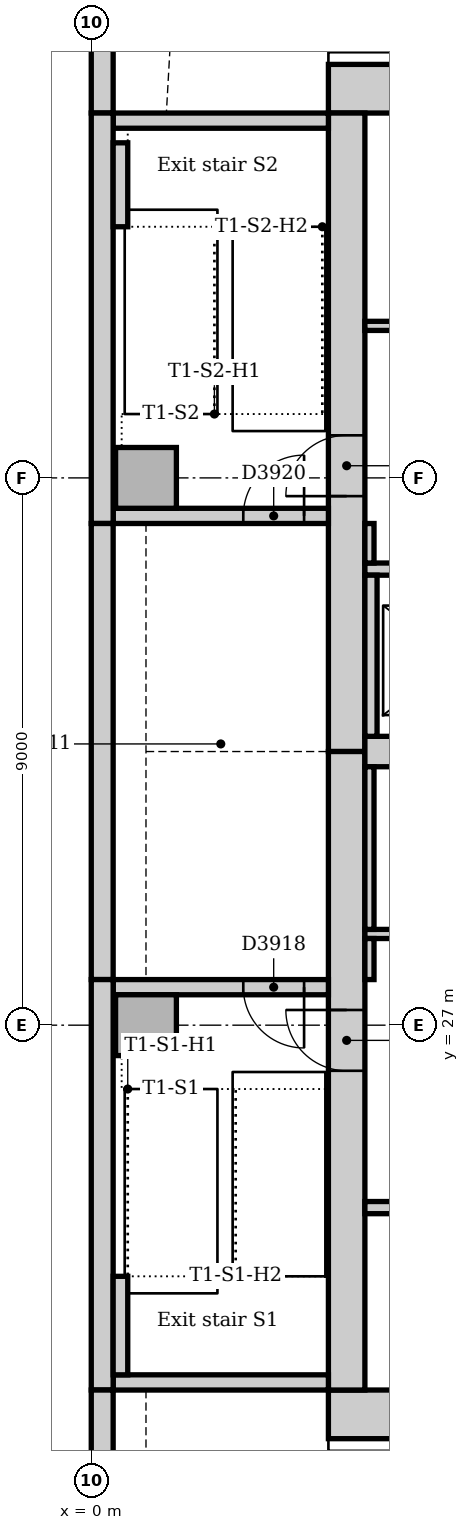
"""IFC4 building model, lengths in metres.
Left out: names, types, materials, properties, quantities, classifications, styles, units other than length and angle.
Written with IfcOpenShell. Run it as: python <this file> out.ifc"""

import sys

from ifc_helpers import new_model, si_unit, direction, frame, frame_2d, origin, origin_2d, place, context, subcontext, project, spatial, rectangle, extrude, element, fill, save


model = new_model("IFC4")
c1 = context("Model", 3, precision=1e-05, world=origin(), true_north=direction((0.0, 1.0)))
c2 = subcontext(c1, "Body", "Model", "MODEL_VIEW")
j1 = project(units=[si_unit("LENGTHUNIT", "METRE"), si_unit("PLANEANGLEUNIT", "RADIAN")], contexts=[c1])
p1 = place(None, origin())
s1 = spatial("IfcSite", under=j1, at=p1, CompositionType="ELEMENT")
p2 = place(p1, origin())
s2 = spatial("IfcBuilding", under=s1, at=p2, CompositionType="ELEMENT")
p3 = place(p2, frame((0.0, 0.0, 100.0)))
s3 = spatial("IfcBuildingStorey", under=s2, at=p3, CompositionType="ELEMENT", Elevation=100.0)
for number, where, z_axis, x_axis in (
    (1, (3.9, 20.6, 0.0), (0.0, 0.0, 1.0), (1.0, 0.0, 0.0)),
    (2, (23.3, 42.4, 0.0), (0.0, 0.0, 1.0), (-1.0, 0.0, 0.0)),
):
    element("IfcWall", number, at=place(p3, frame(where, z_axis=z_axis, x_axis=x_axis)), inside=s3, PredefinedType="SOLIDWALL", context=c2, shape_type="SweptSolid", body=[
        extrude(rectangle(XDim=19.4, YDim=0.8, at=frame_2d((9.7, 0.0))), origin(), (0.0, 0.0, 1.0), 4.0),
    ])
p4 = place(p3, frame((4.2, 42.0, 0.0), z_axis=(0.0, 0.0, 1.0), x_axis=(0.0, -1.0, 0.0)))
e3 = element("IfcWall", 3, at=p4, inside=s3, PredefinedType="SOLIDWALL", context=c2, shape_type="SweptSolid", body=[
    extrude(rectangle(XDim=10.5, YDim=0.6, at=frame_2d((5.25, 0.0))), origin(), (0.0, 0.0, 1.0), 4.0),
])
p5 = place(p4, frame((5.3, 0.0, 0.0)))
e4 = element("IfcOpeningElement", 4, at=p5, cuts=e3, PredefinedType="OPENING", context=c2, shape_type="SweptSolid", body=[
    extrude(rectangle(XDim=1.0, YDim=2.1, at=frame_2d((0.5, 1.05))), frame((0.0, 0.31, 0.0), z_axis=(0.0, -1.0, 0.0), x_axis=(1.0, 0.0, 0.0)), (0.0, 0.0, 1.0), 0.62),
])
p6 = place(p3, frame((4.2, 31.5, 0.0), z_axis=(0.0, 0.0, 1.0), x_axis=(0.0, -1.0, 0.0)))
e5 = element("IfcWall", 5, at=p6, inside=s3, PredefinedType="SOLIDWALL", context=c2, shape_type="SweptSolid", body=[
    extrude(rectangle(XDim=10.5, YDim=0.6, at=frame_2d((5.25, 0.0))), origin(), (0.0, 0.0, 1.0), 4.0),
])
p7 = place(p6, frame((4.25, 0.0, 0.0)))
e6 = element("IfcOpeningElement", 6, at=p7, cuts=e5, PredefinedType="OPENING", context=c2, shape_type="SweptSolid", body=[
    extrude(rectangle(XDim=1.0, YDim=2.1, at=frame_2d((0.5, 1.05))), frame((0.0, 0.31, 0.0), z_axis=(0.0, -1.0, 0.0), x_axis=(1.0, 0.0, 0.0)), (0.0, 0.0, 1.0), 0.62),
])
p8 = place(p3, frame((4.5, 31.5, 0.0), z_axis=(0.0, 0.0, 1.0), x_axis=(1.0, 0.0, 0.0)))
e7 = element("IfcWall", 7, at=p8, inside=s3, PredefinedType="SOLIDWALL", context=c2, shape_type="SweptSolid", body=[
    extrude(rectangle(XDim=18.0, YDim=0.5, at=frame_2d((9.0, 0.0))), origin(), (0.0, 0.0, 1.0), 4.0),
])
p9 = place(p3, frame((0.36, 21.125, 0.0), z_axis=(0.0, 0.0, 1.0), x_axis=(1.0, 0.0, 0.0)))
e8 = element("IfcWall", 8, at=p9, inside=s3, PredefinedType="SOLIDWALL", context=c2, shape_type="SweptSolid", body=[
    extrude(rectangle(XDim=3.54, YDim=0.25, at=frame_2d((1.77, 0.0))), origin(), (0.0, 0.0, 1.0), 4.0),
])
p10 = place(p3, frame((3.9, 27.625, 0.0), z_axis=(0.0, 0.0, 1.0), x_axis=(-1.0, 0.0, 0.0)))
e9 = element("IfcWall", 9, at=p10, inside=s3, PredefinedType="SOLIDWALL", context=c2, shape_type="SweptSolid", body=[
    extrude(rectangle(XDim=3.54, YDim=0.25, at=frame_2d((1.77, 0.0))), origin(), (0.0, 0.0, 1.0), 4.0),
])
p11 = place(p10, frame((0.4, 0.0, 0.0)))
e10 = element("IfcOpeningElement", 10, at=p11, cuts=e9, PredefinedType="OPENING", context=c2, shape_type="SweptSolid", body=[
    extrude(rectangle(XDim=1.0, YDim=2.1, at=frame_2d((0.5, 1.05))), frame((0.0, 0.135, 0.0), z_axis=(0.0, -1.0, 0.0), x_axis=(1.0, 0.0, 0.0)), (0.0, 0.0, 1.0), 0.27),
])
p12 = place(p3, frame((0.36, 35.375, 0.0), z_axis=(0.0, 0.0, 1.0), x_axis=(1.0, 0.0, 0.0)))
e11 = element("IfcWall", 11, at=p12, inside=s3, PredefinedType="SOLIDWALL", context=c2, shape_type="SweptSolid", body=[
    extrude(rectangle(XDim=3.54, YDim=0.25, at=frame_2d((1.77, 0.0))), origin(), (0.0, 0.0, 1.0), 4.0),
])
p13 = place(p12, frame((2.14, 0.0, 0.0)))
e12 = element("IfcOpeningElement", 12, at=p13, cuts=e11, PredefinedType="OPENING", context=c2, shape_type="SweptSolid", body=[
    extrude(rectangle(XDim=1.0, YDim=2.1, at=frame_2d((0.5, 1.05))), frame((0.0, 0.135, 0.0), z_axis=(0.0, -1.0, 0.0), x_axis=(1.0, 0.0, 0.0)), (0.0, 0.0, 1.0), 0.27),
])
p14 = place(p3, frame((3.9, 41.875, 0.0), z_axis=(0.0, 0.0, 1.0), x_axis=(-1.0, 0.0, 0.0)))
e13 = element("IfcWall", 13, at=p14, inside=s3, PredefinedType="SOLIDWALL", context=c2, shape_type="SweptSolid", body=[
    extrude(rectangle(XDim=3.54, YDim=0.25, at=frame_2d((1.77, 0.0))), origin(), (0.0, 0.0, 1.0), 4.0),
])
for number, where, z_axis, x_axis in (
    (14, (0.9, 27.0, 0.0), (0.0, 0.0, 1.0), (1.0, 0.0, 0.0)),
    (15, (0.9, 36.0, 0.0), (0.0, 0.0, 1.0), (1.0, 0.0, 0.0)),
):
    element("IfcColumn", number, at=place(p3, frame(where, z_axis=z_axis, x_axis=x_axis)), inside=s3, PredefinedType="COLUMN", context=c2, shape_type="SweptSolid", body=[
        extrude(rectangle(XDim=1.0, YDim=1.0, at=origin_2d()), origin(), (0.0, 0.0, 1.0), 4.0),
    ])
p15 = place(p3, frame((0.18, 45.257, 0.0), z_axis=(0.0, 0.0, 1.0), x_axis=(0.0, -1.0, 0.0)))
e16 = element("IfcWall", 16, at=p15, inside=s3, PredefinedType="STANDARD", context=c2, shape_type="SweptSolid", body=[
    extrude(rectangle(XDim=3.257, YDim=0.36, at=frame_2d((1.629, 0.0))), origin(), (0.0, 0.0, 1.0), 3.85),
])
p16 = place(p3, frame((0.18, 42.0, 0.0), z_axis=(0.0, 0.0, 1.0), x_axis=(0.0, -1.0, 0.0)))
e17 = element("IfcWall", 17, at=p16, inside=s3, PredefinedType="STANDARD", context=c2, shape_type="SweptSolid", body=[
    extrude(rectangle(XDim=6.75, YDim=0.36, at=frame_2d((3.375, 0.0))), origin(), (0.0, 0.0, 1.0), 3.85),
])
p17 = place(p3, frame((0.18, 35.25, 0.0), z_axis=(0.0, 0.0, 1.0), x_axis=(0.0, -1.0, 0.0)))
e18 = element("IfcWall", 18, at=p17, inside=s3, PredefinedType="STANDARD", context=c2, shape_type="SweptSolid", body=[
    extrude(rectangle(XDim=7.5, YDim=0.36, at=frame_2d((3.75, 0.0))), origin(), (0.0, 0.0, 1.0), 3.85),
])
p18 = place(p3, frame((0.18, 27.75, 0.0), z_axis=(0.0, 0.0, 1.0), x_axis=(0.0, -1.0, 0.0)))
e19 = element("IfcWall", 19, at=p18, inside=s3, PredefinedType="STANDARD", context=c2, shape_type="SweptSolid", body=[
    extrude(rectangle(XDim=6.75, YDim=0.36, at=frame_2d((3.375, 0.0))), origin(), (0.0, 0.0, 1.0), 3.85),
])
p19 = place(p3, frame((0.18, 21.0, 0.0), z_axis=(0.0, 0.0, 1.0), x_axis=(0.0, -1.0, 0.0)))
e20 = element("IfcWall", 20, at=p19, inside=s3, PredefinedType="STANDARD", context=c2, shape_type="SweptSolid", body=[
    extrude(rectangle(XDim=12.257, YDim=0.36, at=frame_2d((6.129, 0.0))), origin(), (0.0, 0.0, 1.0), 3.85),
])
p20 = place(p19, frame((1.35, 0.0, 0.9)))
e21 = element("IfcOpeningElement", 21, at=p20, cuts=e20, PredefinedType="OPENING", context=c2, shape_type="SweptSolid", body=[
    extrude(rectangle(XDim=3.3, YDim=1.6, at=frame_2d((1.65, 0.8))), frame((0.0, 0.19, 0.0), z_axis=(0.0, -1.0, 0.0), x_axis=(1.0, 0.0, 0.0)), (0.0, 0.0, 1.0), 0.38),
])
p21 = place(p19, frame((5.85, 0.0, 0.9)))
e22 = element("IfcOpeningElement", 22, at=p21, cuts=e20, PredefinedType="OPENING", context=c2, shape_type="SweptSolid", body=[
    extrude(rectangle(XDim=3.3, YDim=1.6, at=frame_2d((1.65, 0.8))), frame((0.0, 0.19, 0.0), z_axis=(0.0, -1.0, 0.0), x_axis=(1.0, 0.0, 0.0)), (0.0, 0.0, 1.0), 0.38),
])
p22 = place(p3, frame((0.48, 21.25, 0.0), z_axis=(0.0, 0.0, 1.0), x_axis=(0.0, 1.0, 0.0)))
e23 = element("IfcWall", 23, at=p22, inside=s3, PredefinedType="STANDARD", context=c2, shape_type="SweptSolid", body=[
    extrude(rectangle(XDim=1.62, YDim=0.24, at=frame_2d((0.81, 0.0))), origin(), (0.0, 0.0, 1.0), 4.0),
])
p23 = place(p3, frame((0.48, 40.13, 0.0), z_axis=(0.0, 0.0, 1.0), x_axis=(0.0, 1.0, 0.0)))
e24 = element("IfcWall", 24, at=p23, inside=s3, PredefinedType="STANDARD", context=c2, shape_type="SweptSolid", body=[
    extrude(rectangle(XDim=1.38, YDim=0.24, at=frame_2d((0.69, 0.0))), origin(), (0.0, 0.0, 1.0), 4.0),
])
p24 = place(p3, frame((4.5, 24.0, 0.0), z_axis=(0.0, 0.0, 1.0), x_axis=(1.0, 0.0, 0.0)))
e25 = element("IfcWall", 25, at=p24, inside=s3, PredefinedType="PARTITIONING", context=c2, shape_type="SweptSolid", body=[
    extrude(rectangle(XDim=18.0, YDim=0.2, at=frame_2d((9.0, 0.0))), origin(), (0.0, 0.0, 1.0), 3.85),
])
p25 = place(p24, frame((0.95, 0.0, 0.0)))
e26 = element("IfcOpeningElement", 26, at=p25, cuts=e25, PredefinedType="OPENING", context=c2, shape_type="SweptSolid", body=[
    extrude(rectangle(XDim=1.1, YDim=2.1, at=frame_2d((0.55, 1.05))), frame((0.0, 0.11, 0.0), z_axis=(0.0, -1.0, 0.0), x_axis=(1.0, 0.0, 0.0)), (0.0, 0.0, 1.0), 0.22),
])
p26 = place(p24, frame((3.95, 0.0, 0.0)))
e27 = element("IfcOpeningElement", 27, at=p26, cuts=e25, PredefinedType="OPENING", context=c2, shape_type="SweptSolid", body=[
    extrude(rectangle(XDim=1.1, YDim=2.1, at=frame_2d((0.55, 1.05))), frame((0.0, 0.11, 0.0), z_axis=(0.0, -1.0, 0.0), x_axis=(1.0, 0.0, 0.0)), (0.0, 0.0, 1.0), 0.22),
])
p27 = place(p24, frame((6.95, 0.0, 0.0)))
e28 = element("IfcOpeningElement", 28, at=p27, cuts=e25, PredefinedType="OPENING", context=c2, shape_type="SweptSolid", body=[
    extrude(rectangle(XDim=1.1, YDim=2.1, at=frame_2d((0.55, 1.05))), frame((0.0, 0.11, 0.0), z_axis=(0.0, -1.0, 0.0), x_axis=(1.0, 0.0, 0.0)), (0.0, 0.0, 1.0), 0.22),
])
p28 = place(p24, frame((9.95, 0.0, 0.0)))
e29 = element("IfcOpeningElement", 29, at=p28, cuts=e25, PredefinedType="OPENING", context=c2, shape_type="SweptSolid", body=[
    extrude(rectangle(XDim=1.1, YDim=2.1, at=frame_2d((0.55, 1.05))), frame((0.0, 0.11, 0.0), z_axis=(0.0, -1.0, 0.0), x_axis=(1.0, 0.0, 0.0)), (0.0, 0.0, 1.0), 0.22),
])
p29 = place(p24, frame((12.95, 0.0, 0.0)))
e30 = element("IfcOpeningElement", 30, at=p29, cuts=e25, PredefinedType="OPENING", context=c2, shape_type="SweptSolid", body=[
    extrude(rectangle(XDim=1.1, YDim=2.1, at=frame_2d((0.55, 1.05))), frame((0.0, 0.11, 0.0), z_axis=(0.0, -1.0, 0.0), x_axis=(1.0, 0.0, 0.0)), (0.0, 0.0, 1.0), 0.22),
])
p30 = place(p24, frame((15.95, 0.0, 0.0)))
e31 = element("IfcOpeningElement", 31, at=p30, cuts=e25, PredefinedType="OPENING", context=c2, shape_type="SweptSolid", body=[
    extrude(rectangle(XDim=1.1, YDim=2.1, at=frame_2d((0.55, 1.05))), frame((0.0, 0.11, 0.0), z_axis=(0.0, -1.0, 0.0), x_axis=(1.0, 0.0, 0.0)), (0.0, 0.0, 1.0), 0.22),
])
p31 = place(p3, frame((4.5, 34.5, 0.0), z_axis=(0.0, 0.0, 1.0), x_axis=(1.0, 0.0, 0.0)))
e32 = element("IfcWall", 32, at=p31, inside=s3, PredefinedType="PARTITIONING", context=c2, shape_type="SweptSolid", body=[
    extrude(rectangle(XDim=18.0, YDim=0.2, at=frame_2d((9.0, 0.0))), origin(), (0.0, 0.0, 1.0), 3.85),
])
p32 = place(p31, frame((0.95, 0.0, 0.0)))
e33 = element("IfcOpeningElement", 33, at=p32, cuts=e32, PredefinedType="OPENING", context=c2, shape_type="SweptSolid", body=[
    extrude(rectangle(XDim=1.1, YDim=2.1, at=frame_2d((0.55, 1.05))), frame((0.0, 0.11, 0.0), z_axis=(0.0, -1.0, 0.0), x_axis=(1.0, 0.0, 0.0)), (0.0, 0.0, 1.0), 0.22),
])
p33 = place(p31, frame((3.95, 0.0, 0.0)))
e34 = element("IfcOpeningElement", 34, at=p33, cuts=e32, PredefinedType="OPENING", context=c2, shape_type="SweptSolid", body=[
    extrude(rectangle(XDim=1.1, YDim=2.1, at=frame_2d((0.55, 1.05))), frame((0.0, 0.11, 0.0), z_axis=(0.0, -1.0, 0.0), x_axis=(1.0, 0.0, 0.0)), (0.0, 0.0, 1.0), 0.22),
])
p34 = place(p31, frame((12.95, 0.0, 0.0)))
e35 = element("IfcOpeningElement", 35, at=p34, cuts=e32, PredefinedType="OPENING", context=c2, shape_type="SweptSolid", body=[
    extrude(rectangle(XDim=1.1, YDim=2.1, at=frame_2d((0.55, 1.05))), frame((0.0, 0.11, 0.0), z_axis=(0.0, -1.0, 0.0), x_axis=(1.0, 0.0, 0.0)), (0.0, 0.0, 1.0), 0.22),
])
p35 = place(p31, frame((15.95, 0.0, 0.0)))
e36 = element("IfcOpeningElement", 36, at=p35, cuts=e32, PredefinedType="OPENING", context=c2, shape_type="SweptSolid", body=[
    extrude(rectangle(XDim=1.1, YDim=2.1, at=frame_2d((0.55, 1.05))), frame((0.0, 0.11, 0.0), z_axis=(0.0, -1.0, 0.0), x_axis=(1.0, 0.0, 0.0)), (0.0, 0.0, 1.0), 0.22),
])
p36 = place(p3, frame((4.6, 31.75, 0.0), z_axis=(0.0, 0.0, 1.0), x_axis=(0.0, 1.0, 0.0)))
e37 = element("IfcWall", 37, at=p36, inside=s3, PredefinedType="PARTITIONING", context=c2, shape_type="SweptSolid", body=[
    extrude(rectangle(XDim=2.65, YDim=0.2, at=frame_2d((1.325, 0.0))), origin(), (0.0, 0.0, 1.0), 3.85),
])
p37 = place(p3, frame((4.5, 28.5, 0.0), z_axis=(0.0, 0.0, 1.0), x_axis=(1.0, 0.0, 0.0)))
e38 = element("IfcWall", 38, at=p37, inside=s3, PredefinedType="PARTITIONING", context=c2, shape_type="SweptSolid", body=[
    extrude(rectangle(XDim=18.0, YDim=0.15, at=frame_2d((9.0, 0.0))), origin(), (0.0, 0.0, 1.0), 3.85),
])
p38 = place(p37, frame((3.35, 0.0, 0.0)))
e39 = element("IfcOpeningElement", 39, at=p38, cuts=e38, PredefinedType="OPENING", context=c2, shape_type="SweptSolid", body=[
    extrude(rectangle(XDim=0.9, YDim=2.1, at=frame_2d((0.45, 1.05))), frame((0.0, 0.085, 0.0), z_axis=(0.0, -1.0, 0.0), x_axis=(1.0, 0.0, 0.0)), (0.0, 0.0, 1.0), 0.17),
])
p39 = place(p37, frame((8.55, 0.0, 0.0)))
e40 = element("IfcOpeningElement", 40, at=p39, cuts=e38, PredefinedType="OPENING", context=c2, shape_type="SweptSolid", body=[
    extrude(rectangle(XDim=0.9, YDim=2.1, at=frame_2d((0.45, 1.05))), frame((0.0, 0.085, 0.0), z_axis=(0.0, -1.0, 0.0), x_axis=(1.0, 0.0, 0.0)), (0.0, 0.0, 1.0), 0.17),
])
p40 = place(p37, frame((13.7, 0.0, 0.0)))
e41 = element("IfcOpeningElement", 41, at=p40, cuts=e38, PredefinedType="OPENING", context=c2, shape_type="SweptSolid", body=[
    extrude(rectangle(XDim=0.9, YDim=2.1, at=frame_2d((0.45, 1.05))), frame((0.0, 0.085, 0.0), z_axis=(0.0, -1.0, 0.0), x_axis=(1.0, 0.0, 0.0)), (0.0, 0.0, 1.0), 0.17),
])
p41 = place(p3, frame((4.5, 38.5, 0.0), z_axis=(0.0, 0.0, 1.0), x_axis=(1.0, 0.0, 0.0)))
e42 = element("IfcWall", 42, at=p41, inside=s3, PredefinedType="PARTITIONING", context=c2, shape_type="SweptSolid", body=[
    extrude(rectangle(XDim=11.9, YDim=0.15, at=frame_2d((5.95, 0.0))), origin(), (0.0, 0.0, 1.0), 3.85),
])
p42 = place(p41, frame((1.1, 0.0, 0.0)))
e43 = element("IfcOpeningElement", 43, at=p42, cuts=e42, PredefinedType="OPENING", context=c2, shape_type="SweptSolid", body=[
    extrude(rectangle(XDim=0.9, YDim=2.1, at=frame_2d((0.45, 1.05))), frame((0.0, 0.085, 0.0), z_axis=(0.0, -1.0, 0.0), x_axis=(1.0, 0.0, 0.0)), (0.0, 0.0, 1.0), 0.17),
])
p43 = place(p41, frame((3.3, 0.0, 0.0)))
e44 = element("IfcOpeningElement", 44, at=p43, cuts=e42, PredefinedType="OPENING", context=c2, shape_type="SweptSolid", body=[
    extrude(rectangle(XDim=0.9, YDim=2.1, at=frame_2d((0.45, 1.05))), frame((0.0, 0.085, 0.0), z_axis=(0.0, -1.0, 0.0), x_axis=(1.0, 0.0, 0.0)), (0.0, 0.0, 1.0), 0.17),
])
p44 = place(p41, frame((6.3, 0.0, 0.0)))
e45 = element("IfcOpeningElement", 45, at=p44, cuts=e42, PredefinedType="OPENING", context=c2, shape_type="SweptSolid", body=[
    extrude(rectangle(XDim=0.9, YDim=2.1, at=frame_2d((0.45, 1.05))), frame((0.0, 0.085, 0.0), z_axis=(0.0, -1.0, 0.0), x_axis=(1.0, 0.0, 0.0)), (0.0, 0.0, 1.0), 0.17),
])
p45 = place(p41, frame((9.95, 0.0, 0.0)))
e46 = element("IfcOpeningElement", 46, at=p45, cuts=e42, PredefinedType="OPENING", context=c2, shape_type="SweptSolid", body=[
    extrude(rectangle(XDim=0.8, YDim=2.1, at=frame_2d((0.4, 1.05))), frame((0.0, 0.085, 0.0), z_axis=(0.0, -1.0, 0.0), x_axis=(1.0, 0.0, 0.0)), (0.0, 0.0, 1.0), 0.17),
])
p46 = place(p3, frame((4.575, 27.75, 0.0), z_axis=(0.0, 0.0, 1.0), x_axis=(0.0, 1.0, 0.0)))
e47 = element("IfcWall", 47, at=p46, inside=s3, PredefinedType="PARTITIONING", context=c2, shape_type="SweptSolid", body=[
    extrude(rectangle(XDim=0.675, YDim=0.15, at=frame_2d((0.338, 0.0))), origin(), (0.0, 0.0, 1.0), 3.85),
])
p47 = place(p3, frame((4.575, 28.575, 0.0), z_axis=(0.0, 0.0, 1.0), x_axis=(0.0, 1.0, 0.0)))
e48 = element("IfcWall", 48, at=p47, inside=s3, PredefinedType="PARTITIONING", context=c2, shape_type="SweptSolid", body=[
    extrude(rectangle(XDim=2.675, YDim=0.15, at=frame_2d((1.337, 0.0))), origin(), (0.0, 0.0, 1.0), 3.85),
])
p48 = place(p3, frame((4.575, 34.6, 0.0), z_axis=(0.0, 0.0, 1.0), x_axis=(0.0, 1.0, 0.0)))
e49 = element("IfcWall", 49, at=p48, inside=s3, PredefinedType="PARTITIONING", context=c2, shape_type="SweptSolid", body=[
    extrude(rectangle(XDim=0.65, YDim=0.15, at=frame_2d((0.325, 0.0))), origin(), (0.0, 0.0, 1.0), 3.85),
])
p49 = place(p7, frame((1.0, 0.0, 0.0), z_axis=(0.0, 0.0, 1.0), x_axis=(-1.0, 0.0, 0.0)))
e50 = element("IfcDoor", 50, at=p49, inside=s3, OperationType="SINGLE_SWING_RIGHT", PredefinedType="DOOR", context=c2, shape_type="SweptSolid", body=[
    extrude(rectangle(XDim=1.0, YDim=2.1, at=frame_2d((0.5, 1.05))), frame((0.0, 0.025, 0.0), z_axis=(0.0, -1.0, 0.0), x_axis=(1.0, 0.0, 0.0)), (0.0, 0.0, 1.0), 0.05),
])
fill(e6, e50)
p50 = place(p11, origin())
e51 = element("IfcDoor", 51, at=p50, inside=s3, OperationType="SINGLE_SWING_LEFT", PredefinedType="DOOR", context=c2, shape_type="SweptSolid", body=[
    extrude(rectangle(XDim=1.0, YDim=2.1, at=frame_2d((0.5, 1.05))), frame((0.0, 0.025, 0.0), z_axis=(0.0, -1.0, 0.0), x_axis=(1.0, 0.0, 0.0)), (0.0, 0.0, 1.0), 0.05),
])
fill(e10, e51)
p51 = place(p5, frame((1.0, 0.0, 0.0), z_axis=(0.0, 0.0, 1.0), x_axis=(-1.0, 0.0, 0.0)))
e52 = element("IfcDoor", 52, at=p51, inside=s3, OperationType="SINGLE_SWING_LEFT", PredefinedType="DOOR", context=c2, shape_type="SweptSolid", body=[
    extrude(rectangle(XDim=1.0, YDim=2.1, at=frame_2d((0.5, 1.05))), frame((0.0, 0.025, 0.0), z_axis=(0.0, -1.0, 0.0), x_axis=(1.0, 0.0, 0.0)), (0.0, 0.0, 1.0), 0.05),
])
fill(e4, e52)
p52 = place(p13, origin())
e53 = element("IfcDoor", 53, at=p52, inside=s3, OperationType="SINGLE_SWING_RIGHT", PredefinedType="DOOR", context=c2, shape_type="SweptSolid", body=[
    extrude(rectangle(XDim=1.0, YDim=2.1, at=frame_2d((0.5, 1.05))), frame((0.0, 0.025, 0.0), z_axis=(0.0, -1.0, 0.0), x_axis=(1.0, 0.0, 0.0)), (0.0, 0.0, 1.0), 0.05),
])
fill(e12, e53)
save(model, sys.argv[1])
